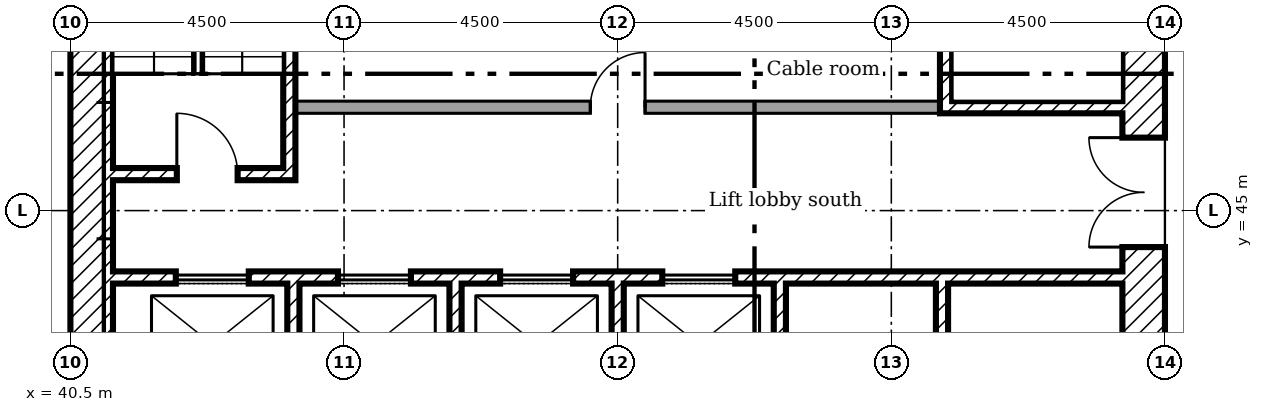
"""IFC4 building model, lengths in metres.
Left out: names, types, materials, properties, quantities, classifications, styles, units other than length and angle.
Written with IfcOpenShell. Run it as: python <this file> out.ifc"""

import sys

from ifc_helpers import new_model, si_unit, direction, frame, frame_2d, origin, place, context, subcontext, project, spatial, rectangle, extrude, element, fill, save


model = new_model("IFC4")
c1 = context("Model", 3, precision=1e-05, world=origin(), true_north=direction((0.0, 1.0)))
c2 = subcontext(c1, "Body", "Model", "MODEL_VIEW")
j1 = project(units=[si_unit("LENGTHUNIT", "METRE"), si_unit("PLANEANGLEUNIT", "RADIAN")], contexts=[c1])
p1 = place(None, origin())
s1 = spatial("IfcSite", under=j1, at=p1, CompositionType="ELEMENT")
p2 = place(p1, origin())
s2 = spatial("IfcBuilding", under=s1, at=p2, CompositionType="ELEMENT")
p3 = place(p2, frame((0.0, 0.0, 102.8)))
s3 = spatial("IfcBuildingStorey", under=s2, at=p3, CompositionType="ELEMENT", Elevation=102.8)
p4 = place(p3, frame((58.15, 40.5, 0.0), z_axis=(0.0, 0.0, 1.0), x_axis=(0.0, 1.0, 0.0)))
e1 = element("IfcWall", 1, at=p4, inside=s3, PredefinedType="SHEAR", context=c2, shape_type="SweptSolid", body=[
    extrude(rectangle(XDim=18.0, YDim=0.7, at=frame_2d((9.0, 0.0))), origin(), (0.0, 0.0, 1.0), 3.35),
])
p5 = place(p4, frame((13.15, 0.0, 0.0)))
e2 = element("IfcOpeningElement", 2, at=p5, cuts=e1, PredefinedType="OPENING", context=c2, shape_type="SweptSolid", body=[
    extrude(rectangle(XDim=1.2, YDim=2.1, at=frame_2d((0.6, 1.05))), frame((0.0, 0.36, 0.0), z_axis=(0.0, -1.0, 0.0), x_axis=(1.0, 0.0, 0.0)), (0.0, 0.0, 1.0), 0.72),
])
p6 = place(p4, frame((3.9, 0.0, 0.0)))
e3 = element("IfcOpeningElement", 3, at=p6, cuts=e1, PredefinedType="OPENING", context=c2, shape_type="SweptSolid", body=[
    extrude(rectangle(XDim=1.8, YDim=2.1, at=frame_2d((0.9, 1.05))), frame((0.0, 0.36, 0.0), z_axis=(0.0, -1.0, 0.0), x_axis=(1.0, 0.0, 0.0)), (0.0, 0.0, 1.0), 0.72),
])
p7 = place(p4, frame((11.525, 0.0, 0.0)))
e4 = element("IfcOpeningElement", 4, at=p7, cuts=e1, PredefinedType="OPENING", context=c2, shape_type="SweptSolid", body=[
    extrude(rectangle(XDim=1.0, YDim=2.1, at=frame_2d((0.5, 1.05))), frame((0.0, 0.36, 0.0), z_axis=(0.0, -1.0, 0.0), x_axis=(1.0, 0.0, 0.0)), (0.0, 0.0, 1.0), 0.72),
])
p8 = place(p3, frame((40.85, 40.5, 0.0), z_axis=(0.0, 0.0, 1.0), x_axis=(0.0, 1.0, 0.0)))
e5 = element("IfcWall", 5, at=p8, inside=s3, PredefinedType="SHEAR", context=c2, shape_type="SweptSolid", body=[
    extrude(rectangle(XDim=18.0, YDim=0.7, at=frame_2d((9.0, 0.0))), origin(), (0.0, 0.0, 1.0), 3.35),
])
for number, where, z_axis, x_axis in (
    (6, (44.167, 41.2, 0.0), (0.0, 0.0, 1.0), (0.0, 1.0, 0.0)),
    (7, (46.833, 41.2, 0.0), (0.0, 0.0, 1.0), (0.0, 1.0, 0.0)),
    (8, (49.5, 41.2, 0.0), (0.0, 0.0, 1.0), (0.0, 1.0, 0.0)),
    (9, (52.167, 41.2, 0.0), (0.0, 0.0, 1.0), (0.0, 1.0, 0.0)),
    (10, (54.833, 41.2, 0.0), (0.0, 0.0, 1.0), (0.0, 1.0, 0.0)),
):
    element("IfcWall", number, at=place(p3, frame(where, z_axis=z_axis, x_axis=x_axis)), inside=s3, PredefinedType="SHEAR", context=c2, shape_type="SweptSolid", body=[
        extrude(rectangle(XDim=2.6, YDim=0.2, at=frame_2d((1.3, 0.0))), origin(), (0.0, 0.0, 1.0), 3.35),
    ])
p9 = place(p3, frame((41.2, 43.9, 0.0)))
e11 = element("IfcWall", 11, at=p9, inside=s3, PredefinedType="SHEAR", context=c2, shape_type="SweptSolid", body=[
    extrude(rectangle(XDim=16.6, YDim=0.2, at=frame_2d((8.3, 0.0))), origin(), (0.0, 0.0, 1.0), 3.35),
])
p10 = place(p9, frame((1.033, 0.0, 0.0)))
e12 = element("IfcOpeningElement", 12, at=p10, cuts=e11, PredefinedType="OPENING", context=c2, shape_type="SweptSolid", body=[
    extrude(rectangle(XDim=1.2, YDim=2.1, at=frame_2d((0.6, 1.05))), frame((0.0, 0.11, 0.0), z_axis=(0.0, -1.0, 0.0), x_axis=(1.0, 0.0, 0.0)), (0.0, 0.0, 1.0), 0.22),
])
p11 = place(p9, frame((3.7, 0.0, 0.0)))
e13 = element("IfcOpeningElement", 13, at=p11, cuts=e11, PredefinedType="OPENING", context=c2, shape_type="SweptSolid", body=[
    extrude(rectangle(XDim=1.2, YDim=2.1, at=frame_2d((0.6, 1.05))), frame((0.0, 0.11, 0.0), z_axis=(0.0, -1.0, 0.0), x_axis=(1.0, 0.0, 0.0)), (0.0, 0.0, 1.0), 0.22),
])
p12 = place(p9, frame((6.367, 0.0, 0.0)))
e14 = element("IfcOpeningElement", 14, at=p12, cuts=e11, PredefinedType="OPENING", context=c2, shape_type="SweptSolid", body=[
    extrude(rectangle(XDim=1.2, YDim=2.1, at=frame_2d((0.6, 1.05))), frame((0.0, 0.11, 0.0), z_axis=(0.0, -1.0, 0.0), x_axis=(1.0, 0.0, 0.0)), (0.0, 0.0, 1.0), 0.22),
])
p13 = place(p9, frame((9.033, 0.0, 0.0)))
e15 = element("IfcOpeningElement", 15, at=p13, cuts=e11, PredefinedType="OPENING", context=c2, shape_type="SweptSolid", body=[
    extrude(rectangle(XDim=1.2, YDim=2.1, at=frame_2d((0.6, 1.05))), frame((0.0, 0.11, 0.0), z_axis=(0.0, -1.0, 0.0), x_axis=(1.0, 0.0, 0.0)), (0.0, 0.0, 1.0), 0.22),
])
p14 = place(p3, frame((44.1, 45.5, 0.0), z_axis=(0.0, 0.0, 1.0), x_axis=(0.0, 1.0, 0.0)))
e16 = element("IfcWall", 16, at=p14, inside=s3, PredefinedType="SHEAR", context=c2, shape_type="SweptSolid", body=[
    extrude(rectangle(XDim=6.9, YDim=0.2, at=frame_2d((3.45, 0.0))), origin(), (0.0, 0.0, 1.0), 3.35),
])
p15 = place(p3, frame((41.2, 45.6, 0.0)))
e17 = element("IfcWall", 17, at=p15, inside=s3, PredefinedType="SHEAR", context=c2, shape_type="SweptSolid", body=[
    extrude(rectangle(XDim=2.8, YDim=0.2, at=frame_2d((1.4, 0.0))), origin(), (0.0, 0.0, 1.0), 3.35),
])
p16 = place(p15, frame((1.05, 0.0, 0.0)))
e18 = element("IfcOpeningElement", 18, at=p16, cuts=e17, PredefinedType="OPENING", context=c2, shape_type="SweptSolid", body=[
    extrude(rectangle(XDim=1.0, YDim=2.1, at=frame_2d((0.5, 1.05))), frame((0.0, 0.11, 0.0), z_axis=(0.0, -1.0, 0.0), x_axis=(1.0, 0.0, 0.0)), (0.0, 0.0, 1.0), 0.22),
])
p17 = place(p3, frame((54.8, 46.7, 0.0)))
e19 = element("IfcWall", 19, at=p17, inside=s3, PredefinedType="SHEAR", context=c2, shape_type="SweptSolid", body=[
    extrude(rectangle(XDim=3.0, YDim=0.2, at=frame_2d((1.5, 0.0))), origin(), (0.0, 0.0, 1.0), 3.35),
])
p18 = place(p3, frame((54.9, 46.8, 0.0), z_axis=(0.0, 0.0, 1.0), x_axis=(0.0, 1.0, 0.0)))
e20 = element("IfcWall", 20, at=p18, inside=s3, PredefinedType="SHEAR", context=c2, shape_type="SweptSolid", body=[
    extrude(rectangle(XDim=6.5, YDim=0.2, at=frame_2d((3.25, 0.0))), origin(), (0.0, 0.0, 1.0), 3.35),
])
p19 = place(p3, frame((44.2, 46.7, 0.0)))
e21 = element("IfcWall", 21, at=p19, inside=s3, PredefinedType="PARTITIONING", context=c2, shape_type="SweptSolid", body=[
    extrude(rectangle(XDim=10.6, YDim=0.2, at=frame_2d((5.3, 0.0))), origin(), (0.0, 0.0, 1.0), 3.35),
])
p20 = place(p19, frame((4.85, 0.0, 0.0)))
e22 = element("IfcOpeningElement", 22, at=p20, cuts=e21, PredefinedType="OPENING", context=c2, shape_type="SweptSolid", body=[
    extrude(rectangle(XDim=0.9, YDim=2.1, at=frame_2d((0.45, 1.05))), frame((0.0, 0.11, 0.0), z_axis=(0.0, -1.0, 0.0), x_axis=(1.0, 0.0, 0.0)), (0.0, 0.0, 1.0), 0.22),
])
p21 = place(p6, origin())
e23 = element("IfcDoor", 23, at=p21, inside=s3, OperationType="DOUBLE_DOOR_SINGLE_SWING", PredefinedType="DOOR", context=c2, shape_type="SweptSolid", body=[
    extrude(rectangle(XDim=1.8, YDim=2.1, at=frame_2d((0.9, 1.05))), frame((0.0, 0.025, 0.0), z_axis=(0.0, -1.0, 0.0), x_axis=(1.0, 0.0, 0.0)), (0.0, 0.0, 1.0), 0.05),
])
fill(e3, e23)
p22 = place(p16, origin())
e24 = element("IfcDoor", 24, at=p22, inside=s3, OperationType="SINGLE_SWING_RIGHT", PredefinedType="DOOR", context=c2, shape_type="SweptSolid", body=[
    extrude(rectangle(XDim=1.0, YDim=2.1, at=frame_2d((0.5, 1.05))), frame((0.0, 0.025, 0.0), z_axis=(0.0, -1.0, 0.0), x_axis=(1.0, 0.0, 0.0)), (0.0, 0.0, 1.0), 0.05),
])
fill(e18, e24)
p23 = place(p20, origin())
e25 = element("IfcDoor", 25, at=p23, inside=s3, OperationType="SINGLE_SWING_LEFT", PredefinedType="DOOR", context=c2, shape_type="SweptSolid", body=[
    extrude(rectangle(XDim=0.9, YDim=2.1, at=frame_2d((0.45, 1.05))), frame((0.0, 0.025, 0.0), z_axis=(0.0, -1.0, 0.0), x_axis=(1.0, 0.0, 0.0)), (0.0, 0.0, 1.0), 0.05),
])
fill(e22, e25)
p24 = place(p10, origin())
e26 = element("IfcDoor", 26, at=p24, inside=s3, OperationType="SLIDING_TO_LEFT", PredefinedType="DOOR", context=c2, shape_type="SweptSolid", body=[
    extrude(rectangle(XDim=1.2, YDim=2.1, at=frame_2d((0.6, 1.05))), frame((0.0, 0.025, 0.0), z_axis=(0.0, -1.0, 0.0), x_axis=(1.0, 0.0, 0.0)), (0.0, 0.0, 1.0), 0.05),
])
fill(e12, e26)
p25 = place(p11, origin())
e27 = element("IfcDoor", 27, at=p25, inside=s3, OperationType="SLIDING_TO_LEFT", PredefinedType="DOOR", context=c2, shape_type="SweptSolid", body=[
    extrude(rectangle(XDim=1.2, YDim=2.1, at=frame_2d((0.6, 1.05))), frame((0.0, 0.025, 0.0), z_axis=(0.0, -1.0, 0.0), x_axis=(1.0, 0.0, 0.0)), (0.0, 0.0, 1.0), 0.05),
])
fill(e13, e27)
p26 = place(p12, origin())
e28 = element("IfcDoor", 28, at=p26, inside=s3, OperationType="SLIDING_TO_LEFT", PredefinedType="DOOR", context=c2, shape_type="SweptSolid", body=[
    extrude(rectangle(XDim=1.2, YDim=2.1, at=frame_2d((0.6, 1.05))), frame((0.0, 0.025, 0.0), z_axis=(0.0, -1.0, 0.0), x_axis=(1.0, 0.0, 0.0)), (0.0, 0.0, 1.0), 0.05),
])
fill(e14, e28)
p27 = place(p13, origin())
e29 = element("IfcDoor", 29, at=p27, inside=s3, OperationType="SLIDING_TO_LEFT", PredefinedType="DOOR", context=c2, shape_type="SweptSolid", body=[
    extrude(rectangle(XDim=1.2, YDim=2.1, at=frame_2d((0.6, 1.05))), frame((0.0, 0.025, 0.0), z_axis=(0.0, -1.0, 0.0), x_axis=(1.0, 0.0, 0.0)), (0.0, 0.0, 1.0), 0.05),
])
fill(e15, e29)
save(model, sys.argv[1])
